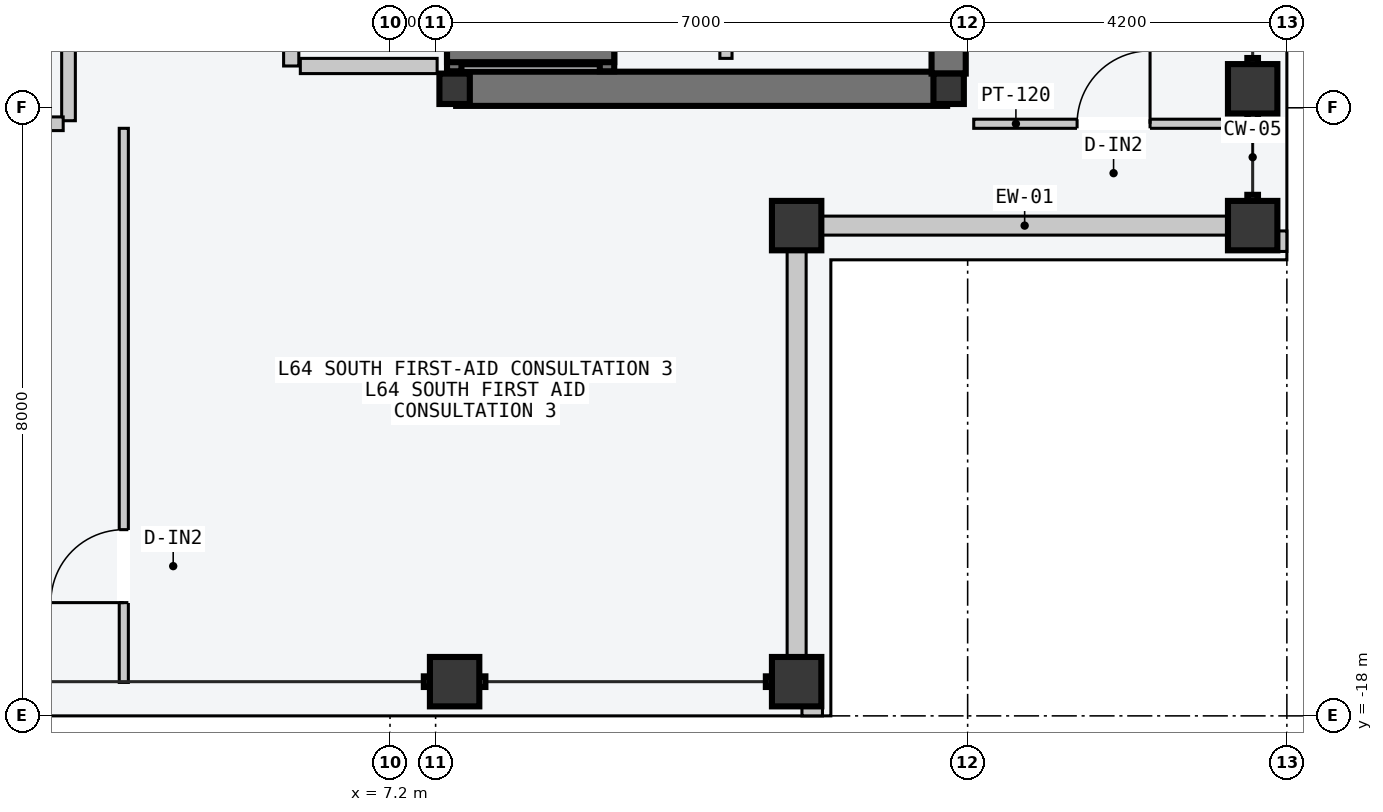
"""IFC4 building model, lengths in metres.
Left out: names, types, materials, properties, quantities, classifications, styles, units other than length and angle.
Written with IfcOpenShell. Run it as: python <this file> out.ifc"""

import sys

from ifc_helpers import new_model, si_unit, direction, frame, frame_2d, origin, origin_2d, place, context, subcontext, project, spatial, rectangle, hollow_rectangle, i_section, extrude, element, fill, save


model = new_model("IFC4")
c1 = context("Model", 3, precision=1e-05, world=origin(), true_north=direction((0.0, 1.0)))
c2 = subcontext(c1, "Body", "Model", "MODEL_VIEW")
j1 = project(units=[si_unit("LENGTHUNIT", "METRE"), si_unit("PLANEANGLEUNIT", "RADIAN")], contexts=[c1])
p1 = place(None, origin())
s1 = spatial("IfcSite", under=j1, at=p1, CompositionType="ELEMENT")
p2 = place(p1, origin())
s2 = spatial("IfcBuilding", under=s1, at=p2, CompositionType="ELEMENT")
p3 = place(p2, frame((0.0, 0.0, 243.6)))
s3 = spatial("IfcBuildingStorey", under=s2, at=p3, CompositionType="ELEMENT", Elevation=243.6)
p4 = place(p3, frame((8.07, -9.75, -0.2), z_axis=(0.0, 0.0, 1.0), x_axis=(1.0, 0.0, 0.0)))
e1 = element("IfcWall", 1, at=p4, inside=s3, PredefinedType="SHEAR", context=c2, shape_type="SweptSolid", body=[
    extrude(rectangle(XDim=6.46, YDim=0.45, at=frame_2d((3.23, 0.0))), origin(), (0.0, 0.0, 1.0), 3.6),
])
p5 = place(p3, frame((14.55, -9.55, -0.2), z_axis=(0.0, 0.0, 1.0), x_axis=(0.0, 1.0, 0.0)))
e2 = element("IfcWall", 2, at=p5, inside=s3, PredefinedType="SHEAR", context=c2, shape_type="SweptSolid", body=[
    extrude(rectangle(XDim=9.35, YDim=0.45, at=frame_2d((4.675, 0.0))), origin(), (0.0, 0.0, 1.0), 3.6),
])
for number, where, z_axis, x_axis in (
    (3, (8.05, -9.75, 0.0), (0.0, 0.0, 1.0), (1.0, 0.0, 0.0)),
    (4, (14.55, -9.75, 0.0), (0.0, 0.0, 1.0), (1.0, 0.0, 0.0)),
):
    element("IfcColumn", number, at=place(p3, frame(where, z_axis=z_axis, x_axis=x_axis)), inside=s3, PredefinedType="COLUMN", context=c2, shape_type="SweptSolid", body=[
        extrude(i_section(OverallWidth=0.4, OverallDepth=0.4, WebThickness=0.013, FlangeThickness=0.021, at=origin_2d()), origin(), (0.0, 0.0, 1.0), 3.6),
    ])
for number, where, z_axis, x_axis in (
    (5, (8.05, -17.55, 0.0), (0.0, 0.0, 1.0), (1.0, 0.0, 0.0)),
    (6, (12.55, -17.55, 0.0), (0.0, 0.0, 1.0), (1.0, 0.0, 0.0)),
    (7, (18.55, -11.55, 0.0), (0.0, 0.0, 1.0), (0.0, 1.0, 0.0)),
    (8, (18.55, -9.75, 0.0), (0.0, 0.0, 1.0), (0.0, 1.0, 0.0)),
    (9, (12.55, -11.55, 0.0), (0.0, 0.0, 1.0), (1.0, 0.0, 0.0)),
):
    element("IfcColumn", number, at=place(p3, frame(where, z_axis=z_axis, x_axis=x_axis)), inside=s3, PredefinedType="COLUMN", context=c2, shape_type="SweptSolid", body=[
        extrude(hollow_rectangle(XDim=0.65, YDim=0.65, WallThickness=0.028, at=origin_2d()), origin(), (0.0, 0.0, 1.0), 3.6),
    ])
for number, where, z_axis, x_axis in (
    (10, (12.885, -11.55, 0.0), (0.0, 0.0, 1.0), (1.0, 0.0, 0.0)),
    (11, (12.55, -17.215, 0.0), (0.0, 0.0, 1.0), (0.0, 1.0, 0.0)),
):
    element("IfcWall", number, at=place(p3, frame(where, z_axis=z_axis, x_axis=x_axis)), inside=s3, PredefinedType="STANDARD", context=c2, shape_type="SweptSolid", body=[
        extrude(rectangle(XDim=5.33, YDim=0.25, at=frame_2d((2.665, 0.0))), origin(), (0.0, 0.0, 1.0), 2.85),
    ])
for number, where, z_axis, x_axis in (
    (12, (12.62, -17.89, 0.0), (0.0, 0.0, 1.0), (1.0, 0.0, 0.0)),
    (13, (18.89, -11.89, 0.0), (0.0, 0.0, 1.0), (0.0, 1.0, 0.0)),
):
    element("IfcWall", number, at=place(p3, frame(where, z_axis=z_axis, x_axis=x_axis)), inside=s3, PredefinedType="PARAPET", context=c2, shape_type="SweptSolid", body=[
        extrude(rectangle(XDim=0.27, YDim=0.22, at=frame_2d((0.135, 0.0))), origin(), (0.0, 0.0, 1.0), 1.2),
    ])
p6 = place(p3, frame((8.045, -9.52, -0.2), z_axis=(0.0, 0.0, 1.0), x_axis=(0.0, 1.0, 0.0)))
e14 = element("IfcWall", 14, at=p6, inside=s3, PredefinedType="SOLIDWALL", context=c2, shape_type="SweptSolid", body=[
    extrude(rectangle(XDim=2.12, YDim=0.19, at=frame_2d((1.06, 0.0))), origin(), (0.0, 0.0, 1.0), 3.6),
])
p7 = place(p6, frame((0.57, 0.0, 0.2)))
e15 = element("IfcOpeningElement", 15, at=p7, cuts=e14, PredefinedType="OPENING", context=c2, shape_type="SweptSolid", body=[
    extrude(rectangle(XDim=1.1, YDim=2.2, at=frame_2d((0.55, 1.1))), frame((0.0, 0.105, 0.0), z_axis=(0.0, -1.0, 0.0), x_axis=(1.0, 0.0, 0.0)), (0.0, 0.0, 1.0), 0.21),
])
p8 = place(p3, frame((10.055, -9.52, -0.2), z_axis=(0.0, 0.0, 1.0), x_axis=(0.0, 1.0, 0.0)))
e16 = element("IfcWall", 16, at=p8, inside=s3, PredefinedType="SOLIDWALL", context=c2, shape_type="SweptSolid", body=[
    extrude(rectangle(XDim=2.12, YDim=0.19, at=frame_2d((1.06, 0.0))), origin(), (0.0, 0.0, 1.0), 3.6),
])
p9 = place(p3, frame((7.95, -9.305, -0.2), z_axis=(0.0, 0.0, 1.0), x_axis=(1.0, 0.0, 0.0)))
e17 = element("IfcWall", 17, at=p9, inside=s3, PredefinedType="SOLIDWALL", context=c2, shape_type="SweptSolid", body=[
    extrude(rectangle(XDim=2.2, YDim=0.19, at=frame_2d((1.1, 0.0))), origin(), (0.0, 0.0, 1.0), 3.6),
])
p10 = place(p3, frame((5.9, -9.45, 0.0), z_axis=(0.0, 0.0, 1.0), x_axis=(0.0, 1.0, 0.0)))
e18 = element("IfcWall", 18, at=p10, inside=s3, PredefinedType="PARTITIONING", context=c2, shape_type="SweptSolid", body=[
    extrude(rectangle(XDim=10.5, YDim=0.2, at=frame_2d((5.25, 0.0))), origin(), (0.0, 0.0, 1.0), 3.4),
])
p11 = place(p10, frame((3.9, 0.0, 0.0)))
e19 = element("IfcOpeningElement", 19, at=p11, cuts=e18, PredefinedType="OPENING", context=c2, shape_type="SweptSolid", body=[
    extrude(rectangle(XDim=1.5, YDim=2.2, at=frame_2d((0.75, 1.1))), frame((0.0, 0.11, 0.0), z_axis=(0.0, -1.0, 0.0), x_axis=(1.0, 0.0, 0.0)), (0.0, 0.0, 1.0), 0.22),
])
p12 = place(p3, frame((6.02, -9.45, 0.0), z_axis=(0.0, 0.0, 1.0), x_axis=(1.0, 0.0, 0.0)))
e20 = element("IfcWall", 20, at=p12, inside=s3, PredefinedType="PARTITIONING", context=c2, shape_type="SweptSolid", body=[
    extrude(rectangle(XDim=1.8, YDim=0.2, at=frame_2d((0.9, 0.0))), origin(), (0.0, 0.0, 1.0), 3.4),
])
p13 = place(p3, frame((11.62, -9.35, 0.0), z_axis=(0.0, 0.0, 1.0), x_axis=(0.0, 1.0, 0.0)))
e21 = element("IfcWall", 21, at=p13, inside=s3, PredefinedType="PARTITIONING", context=c2, shape_type="SweptSolid", body=[
    extrude(rectangle(XDim=3.85, YDim=0.16, at=frame_2d((1.925, 0.0))), origin(), (0.0, 0.0, 1.0), 3.4),
])
p14 = place(p13, frame((0.3, 0.0, 0.0)))
e22 = element("IfcOpeningElement", 22, at=p14, cuts=e21, PredefinedType="OPENING", context=c2, shape_type="SweptSolid", body=[
    extrude(rectangle(XDim=0.85, YDim=2.12, at=frame_2d((0.425, 1.06))), frame((0.0, 0.09, 0.0), z_axis=(0.0, -1.0, 0.0), x_axis=(1.0, 0.0, 0.0)), (0.0, 0.0, 1.0), 0.18),
])
p15 = place(p13, frame((1.5, 0.0, 0.0)))
e23 = element("IfcOpeningElement", 23, at=p15, cuts=e21, PredefinedType="OPENING", context=c2, shape_type="SweptSolid", body=[
    extrude(rectangle(XDim=0.85, YDim=2.12, at=frame_2d((0.425, 1.06))), frame((0.0, 0.09, 0.0), z_axis=(0.0, -1.0, 0.0), x_axis=(1.0, 0.0, 0.0)), (0.0, 0.0, 1.0), 0.18),
])
p16 = place(p13, frame((2.7, 0.0, 0.0)))
e24 = element("IfcOpeningElement", 24, at=p16, cuts=e21, PredefinedType="OPENING", context=c2, shape_type="SweptSolid", body=[
    extrude(rectangle(XDim=0.85, YDim=2.12, at=frame_2d((0.425, 1.06))), frame((0.0, 0.09, 0.0), z_axis=(0.0, -1.0, 0.0), x_axis=(1.0, 0.0, 0.0)), (0.0, 0.0, 1.0), 0.18),
])
p17 = place(p3, frame((2.97, -10.17, 0.0), z_axis=(0.0, 0.0, 1.0), x_axis=(0.0, 1.0, 0.0)))
e25 = element("IfcWall", 25, at=p17, inside=s3, PredefinedType="PARTITIONING", context=c2, shape_type="SweptSolid", body=[
    extrude(rectangle(XDim=4.49, YDim=0.18, at=frame_2d((2.245, 0.0))), origin(), (0.0, 0.0, 1.0), 3.4),
])
p18 = place(p17, frame((1.15, 0.0, 0.0)))
e26 = element("IfcOpeningElement", 26, at=p18, cuts=e25, PredefinedType="OPENING", context=c2, shape_type="SweptSolid", body=[
    extrude(rectangle(XDim=0.96, YDim=2.18, at=frame_2d((0.48, 1.09))), frame((0.0, 0.1, 0.0), z_axis=(0.0, -1.0, 0.0), x_axis=(1.0, 0.0, 0.0)), (0.0, 0.0, 1.0), 0.2),
])
p19 = place(p3, frame((3.698, -17.56, 0.0), z_axis=(0.0, 0.0, 1.0), x_axis=(0.0, 1.0, 0.0)))
e27 = element("IfcWall", 27, at=p19, inside=s3, PredefinedType="PARTITIONING", context=c2, shape_type="SweptSolid", body=[
    extrude(rectangle(XDim=7.29, YDim=0.12, at=frame_2d((3.645, 0.0))), origin(), (0.0, 0.0, 1.0), 3.4),
])
p20 = place(p19, frame((1.05, 0.0, 0.0)))
e28 = element("IfcOpeningElement", 28, at=p20, cuts=e27, PredefinedType="OPENING", context=c2, shape_type="SweptSolid", body=[
    extrude(rectangle(XDim=0.96, YDim=2.18, at=frame_2d((0.48, 1.09))), frame((0.0, 0.07, 0.0), z_axis=(0.0, -1.0, 0.0), x_axis=(1.0, 0.0, 0.0)), (0.0, 0.0, 1.0), 0.14),
])
p21 = place(p3, frame((0.6, -10.21, 0.0), z_axis=(0.0, 0.0, 1.0), x_axis=(1.0, 0.0, 0.0)))
e29 = element("IfcWall", 29, at=p21, inside=s3, PredefinedType="PARTITIONING", context=c2, shape_type="SweptSolid", body=[
    extrude(rectangle(XDim=2.3, YDim=0.18, at=frame_2d((1.15, 0.0))), origin(), (0.0, 0.0, 1.0), 3.4),
])
p22 = place(p21, frame((0.53, 0.0, 0.0)))
e30 = element("IfcOpeningElement", 30, at=p22, cuts=e29, PredefinedType="OPENING", context=c2, shape_type="SweptSolid", body=[
    extrude(rectangle(XDim=1.24, YDim=2.24, at=frame_2d((0.62, 1.12))), frame((0.0, 0.1, 0.0), z_axis=(0.0, -1.0, 0.0), x_axis=(1.0, 0.0, 0.0)), (0.0, 0.0, 1.0), 0.2),
])
p23 = place(p3, frame((14.88, -10.21, 0.0), z_axis=(0.0, 0.0, 1.0), x_axis=(1.0, 0.0, 0.0)))
e31 = element("IfcWall", 31, at=p23, inside=s3, PredefinedType="PARTITIONING", context=c2, shape_type="SweptSolid", body=[
    extrude(rectangle(XDim=3.68, YDim=0.12, at=frame_2d((1.84, 0.0))), origin(), (0.0, 0.0, 1.0), 3.4),
])
p24 = place(p23, frame((1.36, 0.0, 0.0)))
e32 = element("IfcOpeningElement", 32, at=p24, cuts=e31, PredefinedType="OPENING", context=c2, shape_type="SweptSolid", body=[
    extrude(rectangle(XDim=0.96, YDim=2.18, at=frame_2d((0.48, 1.09))), frame((0.0, 0.07, 0.0), z_axis=(0.0, -1.0, 0.0), x_axis=(1.0, 0.0, 0.0)), (0.0, 0.0, 1.0), 0.14),
])
p25 = place(p20, origin())
e33 = element("IfcDoor", 33, at=p25, inside=s3, OperationType="SINGLE_SWING_LEFT", PredefinedType="DOOR", context=c2, shape_type="SweptSolid", body=[
    extrude(rectangle(XDim=0.96, YDim=2.18, at=frame_2d((0.48, 1.09))), frame((0.0, 0.025, 0.0), z_axis=(0.0, -1.0, 0.0), x_axis=(1.0, 0.0, 0.0)), (0.0, 0.0, 1.0), 0.05),
])
fill(e28, e33)
p26 = place(p24, origin())
e34 = element("IfcDoor", 34, at=p26, inside=s3, OperationType="SINGLE_SWING_RIGHT", PredefinedType="DOOR", context=c2, shape_type="SweptSolid", body=[
    extrude(rectangle(XDim=0.96, YDim=2.18, at=frame_2d((0.48, 1.09))), frame((0.0, 0.025, 0.0), z_axis=(0.0, -1.0, 0.0), x_axis=(1.0, 0.0, 0.0)), (0.0, 0.0, 1.0), 0.05),
])
fill(e32, e34)
save(model, sys.argv[1])
